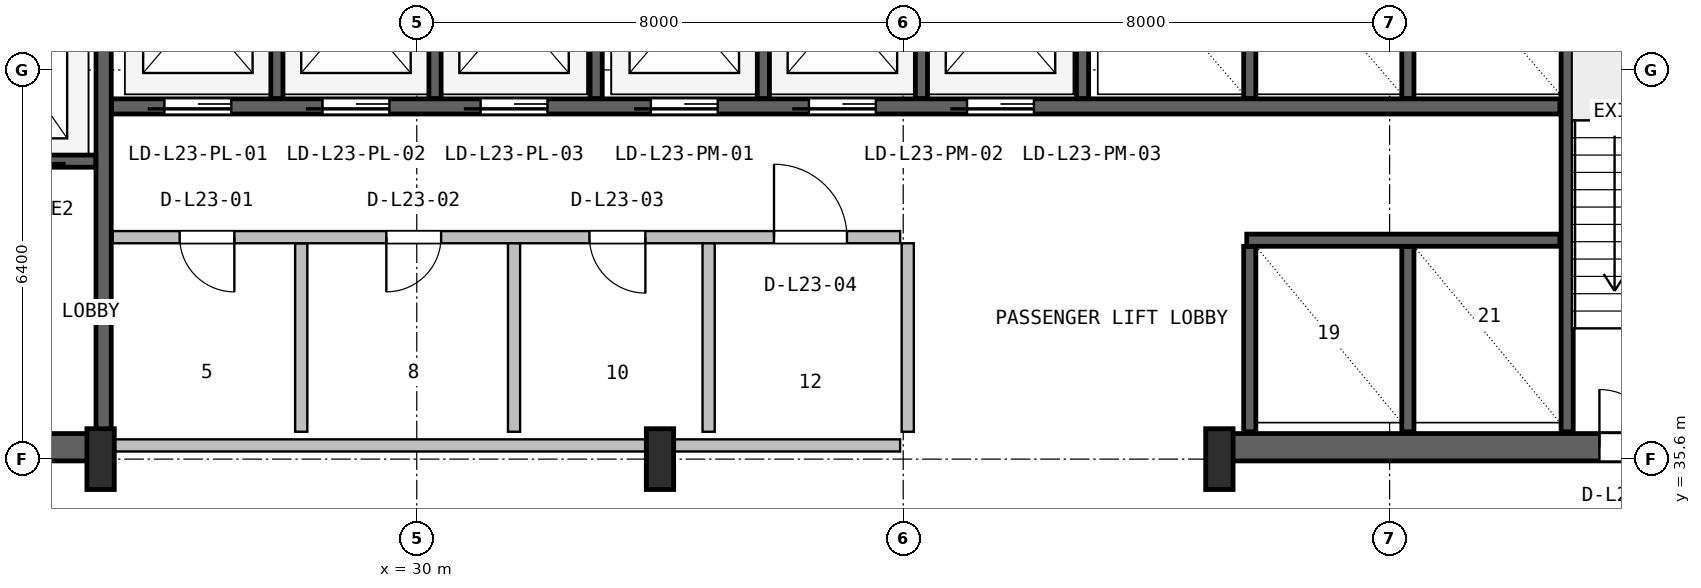
"""IFC4 building model, lengths in metres.
Left out: names, types, materials, properties, quantities, classifications, styles, units other than length and angle.
Written with IfcOpenShell. Run it as: python <this file> out.ifc"""

import sys

from ifc_helpers import new_model, si_unit, direction, frame, frame_2d, origin, origin_2d, place, context, subcontext, project, spatial, rectangle, i_section, extrude, source, transform, mapped, element, fill, save


model = new_model("IFC4")
c1 = context("Model", 3, precision=1e-05, world=origin(), true_north=direction((0.0, 1.0)))
c2 = subcontext(c1, "Body", "Model", "MODEL_VIEW")
j1 = project(units=[si_unit("LENGTHUNIT", "METRE"), si_unit("PLANEANGLEUNIT", "RADIAN")], contexts=[c1])
p1 = place(None, origin())
s1 = spatial("IfcSite", under=j1, at=p1, CompositionType="ELEMENT")
p2 = place(p1, origin())
s2 = spatial("IfcBuilding", under=s1, at=p2, CompositionType="ELEMENT")
p3 = place(p2, frame((0.0, 0.0, 98.4)))
s3 = spatial("IfcBuildingStorey", under=s2, at=p3, CompositionType="ELEMENT", Elevation=98.4)
p4 = place(p3, frame((15.57, 35.795, 0.0), z_axis=(0.0, 0.0, 1.0), x_axis=(1.0, 0.0, 0.0)))
e1 = element("IfcWall", 1, at=p4, inside=s3, PredefinedType="SHEAR", context=c2, shape_type="SweptSolid", body=[
    extrude(rectangle(XDim=9.23, YDim=0.45, at=frame_2d((4.615, 0.0))), origin(), (0.0, 0.0, 1.0), 4.35),
])
p5 = place(p4, frame((5.4, 0.0, 0.0)))
e2 = element("IfcOpeningElement", 2, at=p5, cuts=e1, PredefinedType="OPENING", context=c2, shape_type="SweptSolid", body=[
    extrude(rectangle(XDim=1.0, YDim=2.1, at=frame_2d((0.5, 1.05))), frame((0.0, 0.235, 0.0), z_axis=(0.0, -1.0, 0.0), x_axis=(1.0, 0.0, 0.0)), (0.0, 0.0, 1.0), 0.47),
])
p6 = place(p3, frame((43.2, 35.795, 0.0), z_axis=(0.0, 0.0, 1.0), x_axis=(1.0, 0.0, 0.0)))
e3 = element("IfcWall", 3, at=p6, inside=s3, PredefinedType="SHEAR", context=c2, shape_type="SweptSolid", body=[
    extrude(rectangle(XDim=9.23, YDim=0.45, at=frame_2d((4.615, 0.0))), origin(), (0.0, 0.0, 1.0), 4.35),
])
p7 = place(p6, frame((6.25, 0.0, 0.0)))
e4 = element("IfcOpeningElement", 4, at=p7, cuts=e3, PredefinedType="OPENING", context=c2, shape_type="SweptSolid", body=[
    extrude(rectangle(XDim=0.95, YDim=2.1, at=frame_2d((0.475, 1.05))), frame((0.0, 0.235, 0.0), z_axis=(0.0, -1.0, 0.0), x_axis=(1.0, 0.0, 0.0)), (0.0, 0.0, 1.0), 0.47),
])
m1 = source(origin(), c2, "Body", "SweptSolid", [
    extrude(i_section(OverallWidth=0.45, OverallDepth=1.0, WebThickness=0.016, FlangeThickness=0.03, FilletRadius=0.016, at=origin_2d()), origin(), (0.0, 0.0, 1.0), 4.6),
])
for number, where, z_axis, x_axis in (
    (5, (24.8, 35.6, 0.0), (0.0, 0.0, 1.0), (1.0, 0.0, 0.0)),
    (6, (34.0, 35.6, 0.0), (0.0, 0.0, 1.0), (1.0, 0.0, 0.0)),
    (7, (43.2, 35.6, 0.0), (0.0, 0.0, 1.0), (1.0, 0.0, 0.0)),
):
    element("IfcColumn", number, at=place(p3, frame(where, z_axis=z_axis, x_axis=x_axis)), inside=s3, PredefinedType="COLUMN", context=c2, shape_type="MappedRepresentation", body=[
        mapped(m1, transform((0.0, 0.0, 0.0), x_axis=(1.0, 0.0, 0.0), y_axis=(0.0, 1.0, 0.0), z_axis=(0.0, 0.0, 1.0), scale=1.0)),
    ])
p8 = place(p3, frame((24.85, 36.05, 0.0), z_axis=(0.0, 0.0, 1.0), x_axis=(0.0, 1.0, 0.0)))
e8 = element("IfcWall", 8, at=p8, inside=s3, PredefinedType="SHEAR", context=c2, shape_type="SweptSolid", body=[
    extrude(rectangle(XDim=10.45, YDim=0.25, at=frame_2d((5.225, 0.0))), origin(), (0.0, 0.0, 1.0), 4.35),
])
p9 = place(p3, frame((19.2, 40.5, 0.0), z_axis=(0.0, 0.0, 1.0), x_axis=(1.0, 0.0, 0.0)))
e9 = element("IfcWall", 9, at=p9, inside=s3, PredefinedType="SHEAR", context=c2, shape_type="SweptSolid", body=[
    extrude(rectangle(XDim=5.52, YDim=0.2, at=frame_2d((2.76, 0.0))), origin(), (0.0, 0.0, 1.0), 4.35),
])
p10 = place(p9, frame((1.05, 0.0, 0.0)))
e10 = element("IfcOpeningElement", 10, at=p10, cuts=e9, PredefinedType="OPENING", context=c2, shape_type="SweptSolid", body=[
    extrude(rectangle(XDim=1.1, YDim=2.18, at=frame_2d((0.55, 1.09))), frame((0.0, 0.11, 0.0), z_axis=(0.0, -1.0, 0.0), x_axis=(1.0, 0.0, 0.0)), (0.0, 0.0, 1.0), 0.22),
])
p11 = place(p9, frame((3.65, 0.0, 0.0)))
e11 = element("IfcOpeningElement", 11, at=p11, cuts=e9, PredefinedType="OPENING", context=c2, shape_type="SweptSolid", body=[
    extrude(rectangle(XDim=1.1, YDim=2.18, at=frame_2d((0.55, 1.09))), frame((0.0, 0.11, 0.0), z_axis=(0.0, -1.0, 0.0), x_axis=(1.0, 0.0, 0.0)), (0.0, 0.0, 1.0), 0.22),
])
p12 = place(p3, frame((48.92, 36.05, 0.0), z_axis=(0.0, 0.0, 1.0), x_axis=(0.0, 1.0, 0.0)))
e12 = element("IfcWall", 12, at=p12, inside=s3, PredefinedType="SHEAR", context=c2, shape_type="SweptSolid", body=[
    extrude(rectangle(XDim=10.5, YDim=0.2, at=frame_2d((5.25, 0.0))), origin(), (0.0, 0.0, 1.0), 4.35),
])
p13 = place(p3, frame((24.98, 41.4, 0.0), z_axis=(0.0, 0.0, 1.0), x_axis=(1.0, 0.0, 0.0)))
e13 = element("IfcWall", 13, at=p13, inside=s3, PredefinedType="SHEAR", context=c2, shape_type="SweptSolid", body=[
    extrude(rectangle(XDim=23.82, YDim=0.25, at=frame_2d((11.91, 0.0))), origin(), (0.0, 0.0, 1.0), 4.35),
])
p14 = place(p13, frame((0.87, 0.0, 0.0)))
e14 = element("IfcOpeningElement", 14, at=p14, cuts=e13, PredefinedType="OPENING", context=c2, shape_type="SweptSolid", body=[
    extrude(rectangle(XDim=1.1, YDim=2.18, at=frame_2d((0.55, 1.09))), frame((0.0, 0.135, 0.0), z_axis=(0.0, -1.0, 0.0), x_axis=(1.0, 0.0, 0.0)), (0.0, 0.0, 1.0), 0.27),
])
p15 = place(p13, frame((3.47, 0.0, 0.0)))
e15 = element("IfcOpeningElement", 15, at=p15, cuts=e13, PredefinedType="OPENING", context=c2, shape_type="SweptSolid", body=[
    extrude(rectangle(XDim=1.1, YDim=2.18, at=frame_2d((0.55, 1.09))), frame((0.0, 0.135, 0.0), z_axis=(0.0, -1.0, 0.0), x_axis=(1.0, 0.0, 0.0)), (0.0, 0.0, 1.0), 0.27),
])
p16 = place(p13, frame((6.07, 0.0, 0.0)))
e16 = element("IfcOpeningElement", 16, at=p16, cuts=e13, PredefinedType="OPENING", context=c2, shape_type="SweptSolid", body=[
    extrude(rectangle(XDim=1.1, YDim=2.18, at=frame_2d((0.55, 1.09))), frame((0.0, 0.135, 0.0), z_axis=(0.0, -1.0, 0.0), x_axis=(1.0, 0.0, 0.0)), (0.0, 0.0, 1.0), 0.27),
])
p17 = place(p13, frame((8.87, 0.0, 0.0)))
e17 = element("IfcOpeningElement", 17, at=p17, cuts=e13, PredefinedType="OPENING", context=c2, shape_type="SweptSolid", body=[
    extrude(rectangle(XDim=1.1, YDim=2.18, at=frame_2d((0.55, 1.09))), frame((0.0, 0.135, 0.0), z_axis=(0.0, -1.0, 0.0), x_axis=(1.0, 0.0, 0.0)), (0.0, 0.0, 1.0), 0.27),
])
p18 = place(p13, frame((11.47, 0.0, 0.0)))
e18 = element("IfcOpeningElement", 18, at=p18, cuts=e13, PredefinedType="OPENING", context=c2, shape_type="SweptSolid", body=[
    extrude(rectangle(XDim=1.1, YDim=2.18, at=frame_2d((0.55, 1.09))), frame((0.0, 0.135, 0.0), z_axis=(0.0, -1.0, 0.0), x_axis=(1.0, 0.0, 0.0)), (0.0, 0.0, 1.0), 0.27),
])
p19 = place(p13, frame((14.07, 0.0, 0.0)))
e19 = element("IfcOpeningElement", 19, at=p19, cuts=e13, PredefinedType="OPENING", context=c2, shape_type="SweptSolid", body=[
    extrude(rectangle(XDim=1.1, YDim=2.18, at=frame_2d((0.55, 1.09))), frame((0.0, 0.135, 0.0), z_axis=(0.0, -1.0, 0.0), x_axis=(1.0, 0.0, 0.0)), (0.0, 0.0, 1.0), 0.27),
])
for number, where, z_axis, x_axis in (
    (20, (27.7, 41.53, 0.0), (0.0, 0.0, 1.0), (0.0, 1.0, 0.0)),
    (21, (30.3, 41.53, 0.0), (0.0, 0.0, 1.0), (0.0, 1.0, 0.0)),
):
    element("IfcWall", number, at=place(p3, frame(where, z_axis=z_axis, x_axis=x_axis)), inside=s3, PredefinedType="SHEAR", context=c2, shape_type="SweptSolid", body=[
        extrude(rectangle(XDim=2.87, YDim=0.2, at=frame_2d((1.435, 0.0))), origin(), (0.0, 0.0, 1.0), 4.35),
    ])
p20 = place(p3, frame((32.95, 41.53, 0.0), z_axis=(0.0, 0.0, 1.0), x_axis=(0.0, 1.0, 0.0)))
e22 = element("IfcWall", 22, at=p20, inside=s3, PredefinedType="SHEAR", context=c2, shape_type="SweptSolid", body=[
    extrude(rectangle(XDim=5.02, YDim=0.2, at=frame_2d((2.51, 0.0))), origin(), (0.0, 0.0, 1.0), 4.35),
])
for number, where, z_axis, x_axis in (
    (23, (35.7, 41.53, 0.0), (0.0, 0.0, 1.0), (0.0, 1.0, 0.0)),
    (24, (38.3, 41.53, 0.0), (0.0, 0.0, 1.0), (0.0, 1.0, 0.0)),
):
    element("IfcWall", number, at=place(p3, frame(where, z_axis=z_axis, x_axis=x_axis)), inside=s3, PredefinedType="SHEAR", context=c2, shape_type="SweptSolid", body=[
        extrude(rectangle(XDim=2.87, YDim=0.2, at=frame_2d((1.435, 0.0))), origin(), (0.0, 0.0, 1.0), 4.35),
    ])
p21 = place(p3, frame((40.95, 41.53, 0.0), z_axis=(0.0, 0.0, 1.0), x_axis=(0.0, 1.0, 0.0)))
e25 = element("IfcWall", 25, at=p21, inside=s3, PredefinedType="SHEAR", context=c2, shape_type="SweptSolid", body=[
    extrude(rectangle(XDim=5.02, YDim=0.2, at=frame_2d((2.51, 0.0))), origin(), (0.0, 0.0, 1.0), 4.35),
])
for number, where, z_axis, x_axis in (
    (26, (43.7, 41.53, 0.0), (0.0, 0.0, 1.0), (0.0, 1.0, 0.0)),
    (27, (46.3, 41.53, 0.0), (0.0, 0.0, 1.0), (0.0, 1.0, 0.0)),
):
    element("IfcWall", number, at=place(p3, frame(where, z_axis=z_axis, x_axis=x_axis)), inside=s3, PredefinedType="SHEAR", context=c2, shape_type="SweptSolid", body=[
        extrude(rectangle(XDim=2.87, YDim=0.2, at=frame_2d((1.435, 0.0))), origin(), (0.0, 0.0, 1.0), 4.35),
    ])
for number, where, z_axis, x_axis in (
    (28, (43.7, 36.05, 0.0), (0.0, 0.0, 1.0), (0.0, 1.0, 0.0)),
    (29, (46.3, 36.05, 0.0), (0.0, 0.0, 1.0), (0.0, 1.0, 0.0)),
):
    element("IfcWall", number, at=place(p3, frame(where, z_axis=z_axis, x_axis=x_axis)), inside=s3, PredefinedType="SHEAR", context=c2, shape_type="SweptSolid", body=[
        extrude(rectangle(XDim=3.05, YDim=0.2, at=frame_2d((1.525, 0.0))), origin(), (0.0, 0.0, 1.0), 4.35),
    ])
p22 = place(p3, frame((43.65, 39.2, 0.0), z_axis=(0.0, 0.0, 1.0), x_axis=(1.0, 0.0, 0.0)))
e30 = element("IfcWall", 30, at=p22, inside=s3, PredefinedType="SHEAR", context=c2, shape_type="SweptSolid", body=[
    extrude(rectangle(XDim=5.15, YDim=0.2, at=frame_2d((2.575, 0.0))), origin(), (0.0, 0.0, 1.0), 4.35),
])
p23 = place(p3, frame((25.0, 35.825, 0.0), z_axis=(0.0, 0.0, 1.0), x_axis=(1.0, 0.0, 0.0)))
e31 = element("IfcWall", 31, at=p23, inside=s3, PredefinedType="SOLIDWALL", context=c2, shape_type="SweptSolid", body=[
    extrude(rectangle(XDim=12.95, YDim=0.2, at=frame_2d((6.475, 0.0))), origin(), (0.0, 0.0, 1.0), 3.125),
])
p24 = place(p3, frame((28.1, 36.05, 0.0), z_axis=(0.0, 0.0, 1.0), x_axis=(0.0, 1.0, 0.0)))
e32 = element("IfcWall", 32, at=p24, inside=s3, PredefinedType="PLUMBINGWALL", context=c2, shape_type="SweptSolid", body=[
    extrude(rectangle(XDim=3.1, YDim=0.2, at=frame_2d((1.55, 0.0))), origin(), (0.0, 0.0, 1.0), 4.33),
])
p25 = place(p3, frame((25.0, 39.25, 0.0), z_axis=(0.0, 0.0, 1.0), x_axis=(1.0, 0.0, 0.0)))
e33 = element("IfcWall", 33, at=p25, inside=s3, PredefinedType="SOLIDWALL", context=c2, shape_type="SweptSolid", body=[
    extrude(rectangle(XDim=12.95, YDim=0.2, at=frame_2d((6.475, 0.0))), origin(), (0.0, 0.0, 1.0), 4.33),
])
p26 = place(p25, frame((1.1, 0.0, 0.0)))
e34 = element("IfcOpeningElement", 34, at=p26, cuts=e33, PredefinedType="OPENING", context=c2, shape_type="SweptSolid", body=[
    extrude(rectangle(XDim=0.9, YDim=2.06, at=frame_2d((0.45, 1.03))), frame((0.0, 0.11, 0.0), z_axis=(0.0, -1.0, 0.0), x_axis=(1.0, 0.0, 0.0)), (0.0, 0.0, 1.0), 0.22),
])
p27 = place(p25, frame((4.5, 0.0, 0.0)))
e35 = element("IfcOpeningElement", 35, at=p27, cuts=e33, PredefinedType="OPENING", context=c2, shape_type="SweptSolid", body=[
    extrude(rectangle(XDim=0.9, YDim=2.06, at=frame_2d((0.45, 1.03))), frame((0.0, 0.11, 0.0), z_axis=(0.0, -1.0, 0.0), x_axis=(1.0, 0.0, 0.0)), (0.0, 0.0, 1.0), 0.22),
])
p28 = place(p25, frame((7.84, 0.0, 0.0)))
e36 = element("IfcOpeningElement", 36, at=p28, cuts=e33, PredefinedType="OPENING", context=c2, shape_type="SweptSolid", body=[
    extrude(rectangle(XDim=0.92, YDim=2.08, at=frame_2d((0.46, 1.04))), frame((0.0, 0.11, 0.0), z_axis=(0.0, -1.0, 0.0), x_axis=(1.0, 0.0, 0.0)), (0.0, 0.0, 1.0), 0.22),
])
p29 = place(p25, frame((10.875, 0.0, 0.0)))
e37 = element("IfcOpeningElement", 37, at=p29, cuts=e33, PredefinedType="OPENING", context=c2, shape_type="SweptSolid", body=[
    extrude(rectangle(XDim=1.2, YDim=2.1, at=frame_2d((0.6, 1.05))), frame((0.0, 0.11, 0.0), z_axis=(0.0, -1.0, 0.0), x_axis=(1.0, 0.0, 0.0)), (0.0, 0.0, 1.0), 0.22),
])
p30 = place(p3, frame((31.6, 36.05, 0.0), z_axis=(0.0, 0.0, 1.0), x_axis=(0.0, 1.0, 0.0)))
e38 = element("IfcWall", 38, at=p30, inside=s3, PredefinedType="PLUMBINGWALL", context=c2, shape_type="SweptSolid", body=[
    extrude(rectangle(XDim=3.1, YDim=0.2, at=frame_2d((1.55, 0.0))), origin(), (0.0, 0.0, 1.0), 4.33),
])
for number, where, z_axis, x_axis in (
    (39, (34.8, 36.05, 0.0), (0.0, 0.0, 1.0), (0.0, 1.0, 0.0)),
    (40, (38.075, 36.05, 0.0), (0.0, 0.0, 1.0), (0.0, 1.0, 0.0)),
):
    element("IfcWall", number, at=place(p3, frame(where, z_axis=z_axis, x_axis=x_axis)), inside=s3, PredefinedType="SOLIDWALL", context=c2, shape_type="SweptSolid", body=[
        extrude(rectangle(XDim=3.1, YDim=0.2, at=frame_2d((1.55, 0.0))), origin(), (0.0, 0.0, 1.0), 4.33),
    ])
m2 = source(origin(), c2, "Body", "SweptSolid", [
    extrude(rectangle(XDim=0.95, YDim=2.1, at=frame_2d((0.475, 1.05))), frame((0.0, 0.025, 0.0), z_axis=(0.0, -1.0, 0.0), x_axis=(1.0, 0.0, 0.0)), (0.0, 0.0, 1.0), 0.05),
])
p31 = place(p7, origin())
e41 = element("IfcDoor", 41, at=p31, inside=s3, OperationType="SINGLE_SWING_LEFT", PredefinedType="DOOR", context=c2, shape_type="MappedRepresentation", body=[
    mapped(m2, transform((0.0, 0.0, 0.0), x_axis=(1.0, 0.0, 0.0), y_axis=(0.0, 1.0, 0.0), z_axis=(0.0, 0.0, 1.0), scale=1.0)),
])
fill(e4, e41)
m3 = source(origin(), c2, "Body", "SweptSolid", [
    extrude(rectangle(XDim=1.1, YDim=2.18, at=frame_2d((0.55, 1.09))), frame((0.0, 0.025, 0.0), z_axis=(0.0, -1.0, 0.0), x_axis=(1.0, 0.0, 0.0)), (0.0, 0.0, 1.0), 0.05),
])
p32 = place(p14, frame((1.1, 0.0, 0.0), z_axis=(0.0, 0.0, 1.0), x_axis=(-1.0, 0.0, 0.0)))
e42 = element("IfcDoor", 42, at=p32, inside=s3, OperationType="SLIDING_TO_LEFT", PredefinedType="DOOR", context=c2, shape_type="MappedRepresentation", body=[
    mapped(m3, transform((0.0, 0.0, 0.0), x_axis=(1.0, 0.0, 0.0), y_axis=(0.0, 1.0, 0.0), z_axis=(0.0, 0.0, 1.0), scale=1.0)),
])
fill(e14, e42)
p33 = place(p15, frame((1.1, 0.0, 0.0), z_axis=(0.0, 0.0, 1.0), x_axis=(-1.0, 0.0, 0.0)))
e43 = element("IfcDoor", 43, at=p33, inside=s3, OperationType="SLIDING_TO_LEFT", PredefinedType="DOOR", context=c2, shape_type="MappedRepresentation", body=[
    mapped(m3, transform((0.0, 0.0, 0.0), x_axis=(1.0, 0.0, 0.0), y_axis=(0.0, 1.0, 0.0), z_axis=(0.0, 0.0, 1.0), scale=1.0)),
])
fill(e15, e43)
p34 = place(p16, frame((1.1, 0.0, 0.0), z_axis=(0.0, 0.0, 1.0), x_axis=(-1.0, 0.0, 0.0)))
e44 = element("IfcDoor", 44, at=p34, inside=s3, OperationType="SLIDING_TO_LEFT", PredefinedType="DOOR", context=c2, shape_type="MappedRepresentation", body=[
    mapped(m3, transform((0.0, 0.0, 0.0), x_axis=(1.0, 0.0, 0.0), y_axis=(0.0, 1.0, 0.0), z_axis=(0.0, 0.0, 1.0), scale=1.0)),
])
fill(e16, e44)
p35 = place(p17, frame((1.1, 0.0, 0.0), z_axis=(0.0, 0.0, 1.0), x_axis=(-1.0, 0.0, 0.0)))
e45 = element("IfcDoor", 45, at=p35, inside=s3, OperationType="SLIDING_TO_LEFT", PredefinedType="DOOR", context=c2, shape_type="MappedRepresentation", body=[
    mapped(m3, transform((0.0, 0.0, 0.0), x_axis=(1.0, 0.0, 0.0), y_axis=(0.0, 1.0, 0.0), z_axis=(0.0, 0.0, 1.0), scale=1.0)),
])
fill(e17, e45)
p36 = place(p18, frame((1.1, 0.0, 0.0), z_axis=(0.0, 0.0, 1.0), x_axis=(-1.0, 0.0, 0.0)))
e46 = element("IfcDoor", 46, at=p36, inside=s3, OperationType="SLIDING_TO_LEFT", PredefinedType="DOOR", context=c2, shape_type="MappedRepresentation", body=[
    mapped(m3, transform((0.0, 0.0, 0.0), x_axis=(1.0, 0.0, 0.0), y_axis=(0.0, 1.0, 0.0), z_axis=(0.0, 0.0, 1.0), scale=1.0)),
])
fill(e18, e46)
p37 = place(p19, frame((1.1, 0.0, 0.0), z_axis=(0.0, 0.0, 1.0), x_axis=(-1.0, 0.0, 0.0)))
e47 = element("IfcDoor", 47, at=p37, inside=s3, OperationType="SLIDING_TO_LEFT", PredefinedType="DOOR", context=c2, shape_type="MappedRepresentation", body=[
    mapped(m3, transform((0.0, 0.0, 0.0), x_axis=(1.0, 0.0, 0.0), y_axis=(0.0, 1.0, 0.0), z_axis=(0.0, 0.0, 1.0), scale=1.0)),
])
fill(e19, e47)
m4 = source(origin(), c2, "Body", "SweptSolid", [
    extrude(rectangle(XDim=0.9, YDim=2.06, at=frame_2d((0.45, 1.03))), frame((0.0, 0.025, 0.0), z_axis=(0.0, -1.0, 0.0), x_axis=(1.0, 0.0, 0.0)), (0.0, 0.0, 1.0), 0.05),
])
p38 = place(p26, frame((0.9, 0.0, 0.0), z_axis=(0.0, 0.0, 1.0), x_axis=(-1.0, 0.0, 0.0)))
e48 = element("IfcDoor", 48, at=p38, inside=s3, OperationType="SINGLE_SWING_RIGHT", PredefinedType="DOOR", context=c2, shape_type="MappedRepresentation", body=[
    mapped(m4, transform((0.0, 0.0, 0.0), x_axis=(1.0, 0.0, 0.0), y_axis=(0.0, 1.0, 0.0), z_axis=(0.0, 0.0, 1.0), scale=1.0)),
])
fill(e34, e48)
p39 = place(p27, frame((0.9, 0.0, 0.0), z_axis=(0.0, 0.0, 1.0), x_axis=(-1.0, 0.0, 0.0)))
e49 = element("IfcDoor", 49, at=p39, inside=s3, OperationType="SINGLE_SWING_LEFT", PredefinedType="DOOR", context=c2, shape_type="MappedRepresentation", body=[
    mapped(m4, transform((0.0, 0.0, 0.0), x_axis=(1.0, 0.0, 0.0), y_axis=(0.0, 1.0, 0.0), z_axis=(0.0, 0.0, 1.0), scale=1.0)),
])
fill(e35, e49)
m5 = source(origin(), c2, "Body", "SweptSolid", [
    extrude(rectangle(XDim=0.92, YDim=2.08, at=frame_2d((0.46, 1.04))), frame((0.0, 0.025, 0.0), z_axis=(0.0, -1.0, 0.0), x_axis=(1.0, 0.0, 0.0)), (0.0, 0.0, 1.0), 0.05),
])
p40 = place(p28, frame((0.92, 0.0, 0.0), z_axis=(0.0, 0.0, 1.0), x_axis=(-1.0, 0.0, 0.0)))
e50 = element("IfcDoor", 50, at=p40, inside=s3, OperationType="SINGLE_SWING_RIGHT", PredefinedType="DOOR", context=c2, shape_type="MappedRepresentation", body=[
    mapped(m5, transform((0.0, 0.0, 0.0), x_axis=(1.0, 0.0, 0.0), y_axis=(0.0, 1.0, 0.0), z_axis=(0.0, 0.0, 1.0), scale=1.0)),
])
fill(e36, e50)
m6 = source(origin(), c2, "Body", "SweptSolid", [
    extrude(rectangle(XDim=1.2, YDim=2.1, at=frame_2d((0.6, 1.05))), frame((0.0, 0.025, 0.0), z_axis=(0.0, -1.0, 0.0), x_axis=(1.0, 0.0, 0.0)), (0.0, 0.0, 1.0), 0.05),
])
p41 = place(p29, origin())
e51 = element("IfcDoor", 51, at=p41, inside=s3, OperationType="SINGLE_SWING_LEFT", PredefinedType="DOOR", context=c2, shape_type="MappedRepresentation", body=[
    mapped(m6, transform((0.0, 0.0, 0.0), x_axis=(1.0, 0.0, 0.0), y_axis=(0.0, 1.0, 0.0), z_axis=(0.0, 0.0, 1.0), scale=1.0)),
])
fill(e37, e51)
save(model, sys.argv[1])
